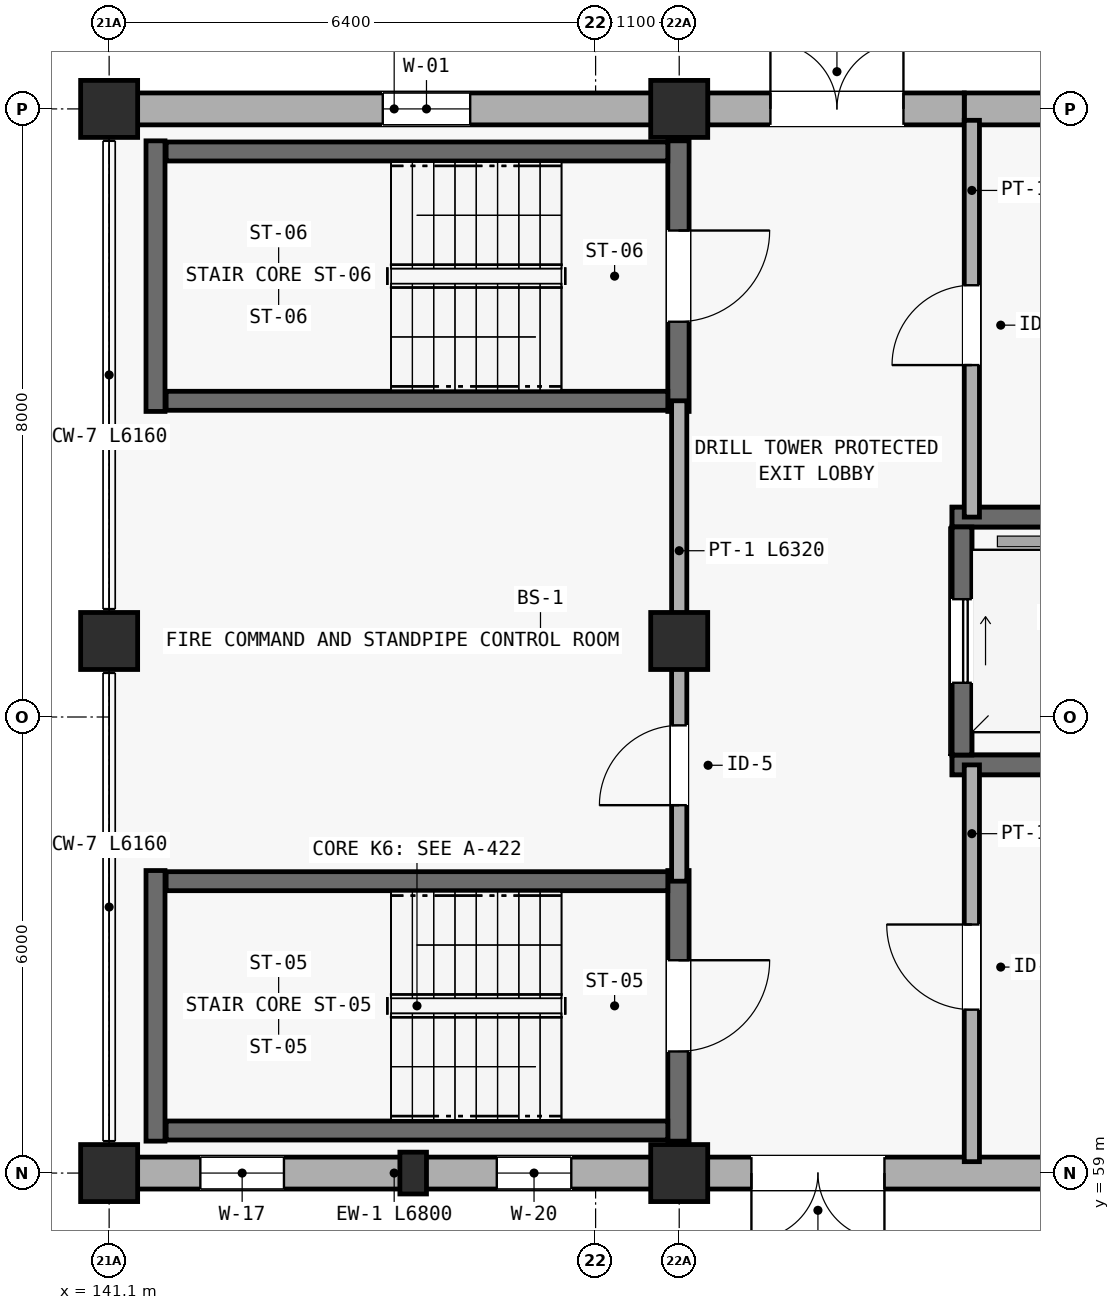
"""IFC4 building model, lengths in metres.
Left out: names, types, materials, properties, quantities, classifications, styles, units other than length and angle.
Written with IfcOpenShell. Run it as: python <this file> out.ifc"""

import sys

from ifc_helpers import new_model, si_unit, direction, frame, frame_2d, origin, origin_2d, place, context, subcontext, project, spatial, rectangle, extrude, element, fill, save


model = new_model("IFC4")
c1 = context("Model", 3, precision=1e-05, world=origin(), true_north=direction((0.0, 1.0)))
c2 = subcontext(c1, "Body", "Model", "MODEL_VIEW")
j1 = project(units=[si_unit("LENGTHUNIT", "METRE"), si_unit("PLANEANGLEUNIT", "RADIAN")], contexts=[c1])
p1 = place(None, origin())
s1 = spatial("IfcSite", under=j1, at=p1, CompositionType="ELEMENT")
p2 = place(p1, origin())
s2 = spatial("IfcBuilding", under=s1, at=p2, CompositionType="ELEMENT")
p3 = place(p2, origin())
s3 = spatial("IfcBuildingStorey", under=s2, at=p3, CompositionType="ELEMENT", Elevation=0.0)
for number, where, z_axis, x_axis in (
    (1, (141.1, 59.0, 0.0), (0.0, 0.0, 1.0), (1.0, 0.0, 0.0)),
    (2, (141.1, 66.0, 0.0), (0.0, 0.0, 1.0), (1.0, 0.0, 0.0)),
    (3, (141.1, 73.0, 0.0), (0.0, 0.0, 1.0), (1.0, 0.0, 0.0)),
    (4, (148.6, 59.0, 0.0), (0.0, 0.0, 1.0), (1.0, 0.0, 0.0)),
    (5, (148.6, 66.0, 0.0), (0.0, 0.0, 1.0), (1.0, 0.0, 0.0)),
    (6, (148.6, 73.0, 0.0), (0.0, 0.0, 1.0), (1.0, 0.0, 0.0)),
):
    element("IfcColumn", number, at=place(p3, frame(where, z_axis=z_axis, x_axis=x_axis)), inside=s3, PredefinedType="COLUMN", context=c2, shape_type="SweptSolid", body=[
        extrude(rectangle(XDim=0.75, YDim=0.75, at=origin_2d()), origin(), (0.0, 0.0, 1.0), 5.85),
    ])
p4 = place(p3, frame((145.1, 59.0, 0.0), z_axis=(0.0, 0.0, 1.0), x_axis=(1.0, 0.0, 0.0)))
e7 = element("IfcColumn", 7, at=p4, inside=s3, PredefinedType="PILASTER", context=c2, shape_type="SweptSolid", body=[
    extrude(rectangle(XDim=0.35, YDim=0.55, at=origin_2d()), origin(), (0.0, 0.0, 1.0), 5.85),
])
p5 = place(p3, frame((141.45, 59.0, 0.0), z_axis=(0.0, 0.0, 1.0), x_axis=(1.0, 0.0, 0.0)))
e8 = element("IfcWall", 8, at=p5, inside=s3, PredefinedType="STANDARD", context=c2, shape_type="SweptSolid", body=[
    extrude(rectangle(XDim=6.8, YDim=0.42, at=frame_2d((3.4, 0.0))), origin(), (0.0, 0.0, 1.0), 5.1),
])
p6 = place(p5, frame((0.85, 0.0, 0.75)))
e9 = element("IfcOpeningElement", 9, at=p6, cuts=e8, PredefinedType="OPENING", context=c2, shape_type="SweptSolid", body=[
    extrude(rectangle(XDim=1.1, YDim=1.35, at=frame_2d((0.55, 0.675))), frame((0.0, 0.22, 0.0), z_axis=(0.0, -1.0, 0.0), x_axis=(1.0, 0.0, 0.0)), (0.0, 0.0, 1.0), 0.44),
])
p7 = place(p5, frame((4.75, 0.0, 0.75)))
e10 = element("IfcOpeningElement", 10, at=p7, cuts=e8, PredefinedType="OPENING", context=c2, shape_type="SweptSolid", body=[
    extrude(rectangle(XDim=0.98, YDim=1.45, at=frame_2d((0.49, 0.725))), frame((0.0, 0.22, 0.0), z_axis=(0.0, -1.0, 0.0), x_axis=(1.0, 0.0, 0.0)), (0.0, 0.0, 1.0), 0.44),
])
p8 = place(p3, frame((148.95, 59.0, 0.0), z_axis=(0.0, 0.0, 1.0), x_axis=(1.0, 0.0, 0.0)))
e11 = element("IfcWall", 11, at=p8, inside=s3, PredefinedType="STANDARD", context=c2, shape_type="SweptSolid", body=[
    extrude(rectangle(XDim=11.7, YDim=0.42, at=frame_2d((5.85, 0.0))), origin(), (0.0, 0.0, 1.0), 5.1),
])
p9 = place(p8, frame((0.6, 0.0, 0.0)))
e12 = element("IfcOpeningElement", 12, at=p9, cuts=e11, PredefinedType="OPENING", context=c2, shape_type="SweptSolid", body=[
    extrude(rectangle(XDim=1.75, YDim=2.2, at=frame_2d((0.875, 1.1))), frame((0.0, 0.22, 0.0), z_axis=(0.0, -1.0, 0.0), x_axis=(1.0, 0.0, 0.0)), (0.0, 0.0, 1.0), 0.44),
])
p10 = place(p8, frame((5.2, 0.0, 0.0)))
e13 = element("IfcOpeningElement", 13, at=p10, cuts=e11, PredefinedType="OPENING", context=c2, shape_type="SweptSolid", body=[
    extrude(rectangle(XDim=2.35, YDim=2.2, at=frame_2d((1.175, 1.1))), frame((0.0, 0.22, 0.0), z_axis=(0.0, -1.0, 0.0), x_axis=(1.0, 0.0, 0.0)), (0.0, 0.0, 1.0), 0.44),
])
p11 = place(p3, frame((160.65, 73.0, 0.0), z_axis=(0.0, 0.0, 1.0), x_axis=(-1.0, 0.0, 0.0)))
e14 = element("IfcWall", 14, at=p11, inside=s3, PredefinedType="STANDARD", context=c2, shape_type="SweptSolid", body=[
    extrude(rectangle(XDim=8.3, YDim=0.42, at=frame_2d((4.15, 0.0))), origin(), (0.0, 0.0, 1.0), 5.1),
])
p12 = place(p11, frame((1.3, 0.0, 0.75)))
e15 = element("IfcOpeningElement", 15, at=p12, cuts=e14, PredefinedType="OPENING", context=c2, shape_type="SweptSolid", body=[
    extrude(rectangle(XDim=0.88, YDim=1.5, at=frame_2d((0.44, 0.75))), frame((0.0, 0.22, 0.0), z_axis=(0.0, -1.0, 0.0), x_axis=(1.0, 0.0, 0.0)), (0.0, 0.0, 1.0), 0.44),
])
p13 = place(p11, frame((4.9, 0.0, 0.75)))
e16 = element("IfcOpeningElement", 16, at=p13, cuts=e14, PredefinedType="OPENING", context=c2, shape_type="SweptSolid", body=[
    extrude(rectangle(XDim=0.88, YDim=1.5, at=frame_2d((0.44, 0.75))), frame((0.0, 0.22, 0.0), z_axis=(0.0, -1.0, 0.0), x_axis=(1.0, 0.0, 0.0)), (0.0, 0.0, 1.0), 0.44),
])
p14 = place(p3, frame((152.35, 73.0, 0.0), z_axis=(0.0, 0.0, 1.0), x_axis=(-1.0, 0.0, 0.0)))
e17 = element("IfcWall", 17, at=p14, inside=s3, PredefinedType="STANDARD", context=c2, shape_type="SweptSolid", body=[
    extrude(rectangle(XDim=3.375, YDim=0.42, at=frame_2d((1.688, 0.0))), origin(), (0.0, 0.0, 1.0), 4.8),
])
p15 = place(p14, frame((0.8, 0.0, 0.0)))
e18 = element("IfcOpeningElement", 18, at=p15, cuts=e17, PredefinedType="OPENING", context=c2, shape_type="SweptSolid", body=[
    extrude(rectangle(XDim=1.75, YDim=2.2, at=frame_2d((0.875, 1.1))), frame((0.0, 0.22, 0.0), z_axis=(0.0, -1.0, 0.0), x_axis=(1.0, 0.0, 0.0)), (0.0, 0.0, 1.0), 0.44),
])
p16 = place(p3, frame((148.25, 73.0, 0.0), z_axis=(0.0, 0.0, 1.0), x_axis=(-1.0, 0.0, 0.0)))
e19 = element("IfcWall", 19, at=p16, inside=s3, PredefinedType="STANDARD", context=c2, shape_type="SweptSolid", body=[
    extrude(rectangle(XDim=6.8, YDim=0.42, at=frame_2d((3.4, 0.0))), origin(), (0.0, 0.0, 1.0), 5.1),
])
p17 = place(p16, frame((2.4, 0.0, 0.75)))
e20 = element("IfcOpeningElement", 20, at=p17, cuts=e19, PredefinedType="OPENING", context=c2, shape_type="SweptSolid", body=[
    extrude(rectangle(XDim=1.15, YDim=1.45, at=frame_2d((0.575, 0.725))), frame((0.0, 0.22, 0.0), z_axis=(0.0, -1.0, 0.0), x_axis=(1.0, 0.0, 0.0)), (0.0, 0.0, 1.0), 0.44),
])
p18 = place(p3, frame((148.59, 62.98, 0.0), z_axis=(0.0, 0.0, 1.0), x_axis=(0.0, -1.0, 0.0)))
e21 = element("IfcWall", 21, at=p18, inside=s3, PredefinedType="SHEAR", context=c2, shape_type="SweptSolid", body=[
    extrude(rectangle(XDim=3.56, YDim=0.28, at=frame_2d((1.78, 0.0))), origin(), (0.0, 0.0, 1.0), 5.6),
])
p19 = place(p18, frame((1.18, 0.0, 0.0)))
e22 = element("IfcOpeningElement", 22, at=p19, cuts=e21, PredefinedType="OPENING", context=c2, shape_type="SweptSolid", body=[
    extrude(rectangle(XDim=1.2, YDim=2.15, at=frame_2d((0.6, 1.075))), frame((0.0, 0.15, 0.0), z_axis=(0.0, -1.0, 0.0), x_axis=(1.0, 0.0, 0.0)), (0.0, 0.0, 1.0), 0.3),
])
p20 = place(p3, frame((141.71, 59.42, 0.0), z_axis=(0.0, 0.0, 1.0), x_axis=(0.0, 1.0, 0.0)))
e23 = element("IfcWall", 23, at=p20, inside=s3, PredefinedType="SHEAR", context=c2, shape_type="SweptSolid", body=[
    extrude(rectangle(XDim=3.56, YDim=0.25, at=frame_2d((1.78, 0.0))), origin(), (0.0, 0.0, 1.0), 5.6),
])
for number, where, z_axis, x_axis in (
    (24, (148.45, 62.84, 0.0), (0.0, 0.0, 1.0), (-1.0, 0.0, 0.0)),
    (25, (141.85, 59.56, 0.0), (0.0, 0.0, 1.0), (1.0, 0.0, 0.0)),
):
    element("IfcWall", number, at=place(p3, frame(where, z_axis=z_axis, x_axis=x_axis)), inside=s3, PredefinedType="SHEAR", context=c2, shape_type="SweptSolid", body=[
        extrude(rectangle(XDim=6.6, YDim=0.25, at=frame_2d((3.3, 0.0))), origin(), (0.0, 0.0, 1.0), 5.6),
    ])
p21 = place(p3, frame((148.59, 72.58, 0.0), z_axis=(0.0, 0.0, 1.0), x_axis=(0.0, -1.0, 0.0)))
e26 = element("IfcWall", 26, at=p21, inside=s3, PredefinedType="SHEAR", context=c2, shape_type="SweptSolid", body=[
    extrude(rectangle(XDim=3.56, YDim=0.28, at=frame_2d((1.78, 0.0))), origin(), (0.0, 0.0, 1.0), 5.6),
])
p22 = place(p21, frame((1.18, 0.0, 0.0)))
e27 = element("IfcOpeningElement", 27, at=p22, cuts=e26, PredefinedType="OPENING", context=c2, shape_type="SweptSolid", body=[
    extrude(rectangle(XDim=1.2, YDim=2.15, at=frame_2d((0.6, 1.075))), frame((0.0, 0.15, 0.0), z_axis=(0.0, -1.0, 0.0), x_axis=(1.0, 0.0, 0.0)), (0.0, 0.0, 1.0), 0.3),
])
p23 = place(p3, frame((141.71, 69.02, 0.0), z_axis=(0.0, 0.0, 1.0), x_axis=(0.0, 1.0, 0.0)))
e28 = element("IfcWall", 28, at=p23, inside=s3, PredefinedType="SHEAR", context=c2, shape_type="SweptSolid", body=[
    extrude(rectangle(XDim=3.56, YDim=0.25, at=frame_2d((1.78, 0.0))), origin(), (0.0, 0.0, 1.0), 5.6),
])
for number, where, z_axis, x_axis in (
    (29, (148.45, 72.44, 0.0), (0.0, 0.0, 1.0), (-1.0, 0.0, 0.0)),
    (30, (141.85, 69.16, 0.0), (0.0, 0.0, 1.0), (1.0, 0.0, 0.0)),
):
    element("IfcWall", number, at=place(p3, frame(where, z_axis=z_axis, x_axis=x_axis)), inside=s3, PredefinedType="SHEAR", context=c2, shape_type="SweptSolid", body=[
        extrude(rectangle(XDim=6.6, YDim=0.25, at=frame_2d((3.3, 0.0))), origin(), (0.0, 0.0, 1.0), 5.6),
    ])
for number, where, z_axis, x_axis in (
    (31, (152.19, 64.37, -1.15), (0.0, 0.0, 1.0), (1.0, 0.0, 0.0)),
    (32, (155.11, 67.63, -1.15), (0.0, 0.0, 1.0), (-1.0, 0.0, 0.0)),
):
    element("IfcWall", number, at=place(p3, frame(where, z_axis=z_axis, x_axis=x_axis)), inside=s3, PredefinedType="SHEAR", context=c2, shape_type="SweptSolid", body=[
        extrude(rectangle(XDim=2.92, YDim=0.26, at=frame_2d((1.46, 0.0))), origin(), (0.0, 0.0, 1.0), 1.15),
    ])
p24 = place(p3, frame((152.32, 67.5, -1.15), z_axis=(0.0, 0.0, 1.0), x_axis=(0.0, -1.0, 0.0)))
e33 = element("IfcWall", 33, at=p24, inside=s3, PredefinedType="SHEAR", context=c2, shape_type="SweptSolid", body=[
    extrude(rectangle(XDim=3.0, YDim=0.26, at=frame_2d((1.5, 0.0))), origin(), (0.0, 0.0, 1.0), 1.15),
])
for number, where, z_axis, x_axis in (
    (34, (152.19, 64.37, 0.0), (0.0, 0.0, 1.0), (1.0, 0.0, 0.0)),
    (35, (155.11, 67.63, 0.0), (0.0, 0.0, 1.0), (-1.0, 0.0, 0.0)),
):
    element("IfcWall", number, at=place(p3, frame(where, z_axis=z_axis, x_axis=x_axis)), inside=s3, PredefinedType="SHEAR", context=c2, shape_type="SweptSolid", body=[
        extrude(rectangle(XDim=2.92, YDim=0.26, at=frame_2d((1.46, 0.0))), origin(), (0.0, 0.0, 1.0), 5.6),
    ])
p25 = place(p3, frame((152.32, 67.5, 0.0), z_axis=(0.0, 0.0, 1.0), x_axis=(0.0, -1.0, 0.0)))
e36 = element("IfcWall", 36, at=p25, inside=s3, PredefinedType="SHEAR", context=c2, shape_type="SweptSolid", body=[
    extrude(rectangle(XDim=3.0, YDim=0.26, at=frame_2d((1.5, 0.0))), origin(), (0.0, 0.0, 1.0), 5.6),
])
p26 = place(p25, frame((0.95, 0.0, 0.0)))
e37 = element("IfcOpeningElement", 37, at=p26, cuts=e36, PredefinedType="OPENING", context=c2, shape_type="SweptSolid", body=[
    extrude(rectangle(XDim=1.1, YDim=2.15, at=frame_2d((0.55, 1.075))), frame((0.0, 0.14, 0.0), z_axis=(0.0, -1.0, 0.0), x_axis=(1.0, 0.0, 0.0)), (0.0, 0.0, 1.0), 0.28),
])
p27 = place(p3, frame((148.6, 62.84, 0.0), z_axis=(0.0, 0.0, 1.0), x_axis=(0.0, 1.0, 0.0)))
e38 = element("IfcWall", 38, at=p27, inside=s3, PredefinedType="PARTITIONING", context=c2, shape_type="SweptSolid", body=[
    extrude(rectangle(XDim=6.32, YDim=0.2, at=frame_2d((3.16, 0.0))), origin(), (0.0, 0.0, 1.0), 5.05),
])
p28 = place(p27, frame((1.0, 0.0, 0.0)))
e39 = element("IfcOpeningElement", 39, at=p28, cuts=e38, PredefinedType="OPENING", context=c2, shape_type="SweptSolid", body=[
    extrude(rectangle(XDim=1.05, YDim=2.14, at=frame_2d((0.525, 1.07))), frame((0.0, 0.11, 0.0), z_axis=(0.0, -1.0, 0.0), x_axis=(1.0, 0.0, 0.0)), (0.0, 0.0, 1.0), 0.22),
])
p29 = place(p3, frame((152.45, 59.15, 0.0), z_axis=(0.0, 0.0, 1.0), x_axis=(0.0, 1.0, 0.0)))
e40 = element("IfcWall", 40, at=p29, inside=s3, PredefinedType="PARTITIONING", context=c2, shape_type="SweptSolid", body=[
    extrude(rectangle(XDim=5.22, YDim=0.2, at=frame_2d((2.61, 0.0))), origin(), (0.0, 0.0, 1.0), 5.05),
])
p30 = place(p29, frame((2.0, 0.0, 0.0)))
e41 = element("IfcOpeningElement", 41, at=p30, cuts=e40, PredefinedType="OPENING", context=c2, shape_type="SweptSolid", body=[
    extrude(rectangle(XDim=1.12, YDim=2.15, at=frame_2d((0.56, 1.075))), frame((0.0, 0.11, 0.0), z_axis=(0.0, -1.0, 0.0), x_axis=(1.0, 0.0, 0.0)), (0.0, 0.0, 1.0), 0.22),
])
p31 = place(p3, frame((152.45, 67.63, 0.0), z_axis=(0.0, 0.0, 1.0), x_axis=(0.0, 1.0, 0.0)))
e42 = element("IfcWall", 42, at=p31, inside=s3, PredefinedType="PARTITIONING", context=c2, shape_type="SweptSolid", body=[
    extrude(rectangle(XDim=5.22, YDim=0.2, at=frame_2d((2.61, 0.0))), origin(), (0.0, 0.0, 1.0), 5.05),
])
p32 = place(p31, frame((2.0, 0.0, 0.0)))
e43 = element("IfcOpeningElement", 43, at=p32, cuts=e42, PredefinedType="OPENING", context=c2, shape_type="SweptSolid", body=[
    extrude(rectangle(XDim=1.05, YDim=2.14, at=frame_2d((0.525, 1.07))), frame((0.0, 0.11, 0.0), z_axis=(0.0, -1.0, 0.0), x_axis=(1.0, 0.0, 0.0)), (0.0, 0.0, 1.0), 0.22),
])
p33 = place(p6, origin())
e44 = element("IfcWindow", 44, at=p33, inside=s3, PartitioningType="SINGLE_PANEL", PredefinedType="WINDOW", context=c2, shape_type="SweptSolid", body=[
    extrude(rectangle(XDim=1.1, YDim=1.35, at=frame_2d((0.55, 0.675))), frame((0.0, 0.03, 0.0), z_axis=(0.0, -1.0, 0.0), x_axis=(1.0, 0.0, 0.0)), (0.0, 0.0, 1.0), 0.06),
])
fill(e9, e44)
p34 = place(p7, origin())
e45 = element("IfcWindow", 45, at=p34, inside=s3, PartitioningType="SINGLE_PANEL", PredefinedType="WINDOW", context=c2, shape_type="SweptSolid", body=[
    extrude(rectangle(XDim=0.98, YDim=1.45, at=frame_2d((0.49, 0.725))), frame((0.0, 0.03, 0.0), z_axis=(0.0, -1.0, 0.0), x_axis=(1.0, 0.0, 0.0)), (0.0, 0.0, 1.0), 0.06),
])
fill(e10, e45)
p35 = place(p9, frame((1.75, 0.0, 0.0), z_axis=(0.0, 0.0, 1.0), x_axis=(-1.0, 0.0, 0.0)))
e46 = element("IfcDoor", 46, at=p35, inside=s3, OperationType="DOUBLE_DOOR_SINGLE_SWING", PredefinedType="DOOR", context=c2, shape_type="SweptSolid", body=[
    extrude(rectangle(XDim=1.75, YDim=2.2, at=frame_2d((0.875, 1.1))), frame((0.0, 0.025, 0.0), z_axis=(0.0, -1.0, 0.0), x_axis=(1.0, 0.0, 0.0)), (0.0, 0.0, 1.0), 0.05),
])
fill(e12, e46)
p36 = place(p15, frame((1.75, 0.0, 0.0), z_axis=(0.0, 0.0, 1.0), x_axis=(-1.0, 0.0, 0.0)))
e47 = element("IfcDoor", 47, at=p36, inside=s3, OperationType="DOUBLE_DOOR_SINGLE_SWING", PredefinedType="DOOR", context=c2, shape_type="SweptSolid", body=[
    extrude(rectangle(XDim=1.75, YDim=2.2, at=frame_2d((0.875, 1.1))), frame((0.0, 0.025, 0.0), z_axis=(0.0, -1.0, 0.0), x_axis=(1.0, 0.0, 0.0)), (0.0, 0.0, 1.0), 0.05),
])
fill(e18, e47)
p37 = place(p17, origin())
e48 = element("IfcWindow", 48, at=p37, inside=s3, PartitioningType="SINGLE_PANEL", PredefinedType="WINDOW", context=c2, shape_type="SweptSolid", body=[
    extrude(rectangle(XDim=1.15, YDim=1.45, at=frame_2d((0.575, 0.725))), frame((0.0, 0.03, 0.0), z_axis=(0.0, -1.0, 0.0), x_axis=(1.0, 0.0, 0.0)), (0.0, 0.0, 1.0), 0.06),
])
fill(e20, e48)
p38 = place(p19, origin())
e49 = element("IfcDoor", 49, at=p38, inside=s3, OperationType="SINGLE_SWING_LEFT", PredefinedType="DOOR", context=c2, shape_type="SweptSolid", body=[
    extrude(rectangle(XDim=1.2, YDim=2.15, at=frame_2d((0.6, 1.075))), frame((0.0, 0.025, 0.0), z_axis=(0.0, -1.0, 0.0), x_axis=(1.0, 0.0, 0.0)), (0.0, 0.0, 1.0), 0.05),
])
fill(e22, e49)
p39 = place(p22, origin())
e50 = element("IfcDoor", 50, at=p39, inside=s3, OperationType="SINGLE_SWING_LEFT", PredefinedType="DOOR", context=c2, shape_type="SweptSolid", body=[
    extrude(rectangle(XDim=1.2, YDim=2.15, at=frame_2d((0.6, 1.075))), frame((0.0, 0.025, 0.0), z_axis=(0.0, -1.0, 0.0), x_axis=(1.0, 0.0, 0.0)), (0.0, 0.0, 1.0), 0.05),
])
fill(e27, e50)
p40 = place(p26, origin())
e51 = element("IfcDoor", 51, at=p40, inside=s3, OperationType="SLIDING_TO_LEFT", PredefinedType="DOOR", context=c2, shape_type="SweptSolid", body=[
    extrude(rectangle(XDim=1.1, YDim=2.15, at=frame_2d((0.55, 1.075))), frame((0.0, 0.025, 0.0), z_axis=(0.0, -1.0, 0.0), x_axis=(1.0, 0.0, 0.0)), (0.0, 0.0, 1.0), 0.05),
])
fill(e37, e51)
p41 = place(p28, origin())
e52 = element("IfcDoor", 52, at=p41, inside=s3, OperationType="SINGLE_SWING_LEFT", PredefinedType="DOOR", context=c2, shape_type="SweptSolid", body=[
    extrude(rectangle(XDim=1.05, YDim=2.14, at=frame_2d((0.525, 1.07))), frame((0.0, 0.025, 0.0), z_axis=(0.0, -1.0, 0.0), x_axis=(1.0, 0.0, 0.0)), (0.0, 0.0, 1.0), 0.05),
])
fill(e39, e52)
p42 = place(p30, origin())
e53 = element("IfcDoor", 53, at=p42, inside=s3, OperationType="SINGLE_SWING_RIGHT", PredefinedType="DOOR", context=c2, shape_type="SweptSolid", body=[
    extrude(rectangle(XDim=1.12, YDim=2.15, at=frame_2d((0.56, 1.075))), frame((0.0, 0.025, 0.0), z_axis=(0.0, -1.0, 0.0), x_axis=(1.0, 0.0, 0.0)), (0.0, 0.0, 1.0), 0.05),
])
fill(e41, e53)
p43 = place(p32, origin())
e54 = element("IfcDoor", 54, at=p43, inside=s3, OperationType="SINGLE_SWING_LEFT", PredefinedType="DOOR", context=c2, shape_type="SweptSolid", body=[
    extrude(rectangle(XDim=1.05, YDim=2.14, at=frame_2d((0.525, 1.07))), frame((0.0, 0.025, 0.0), z_axis=(0.0, -1.0, 0.0), x_axis=(1.0, 0.0, 0.0)), (0.0, 0.0, 1.0), 0.05),
])
fill(e43, e54)
save(model, sys.argv[1])
